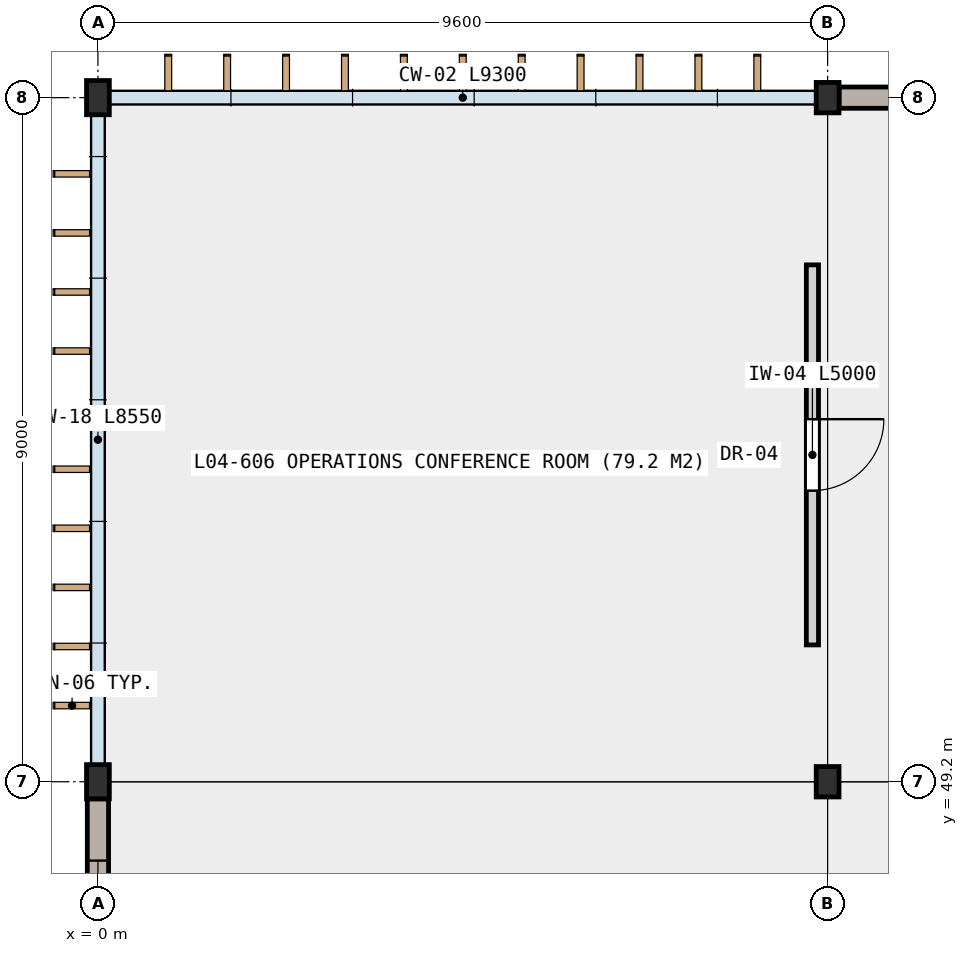
"""IFC4 building model, lengths in metres.
Left out: names, types, materials, properties, quantities, classifications, styles, units other than length and angle.
Written with IfcOpenShell. Run it as: python <this file> out.ifc"""

import sys

from ifc_helpers import new_model, si_unit, direction, frame, frame_2d, origin, origin_2d, place, context, subcontext, project, spatial, rectangle, i_section, extrude, element, fill, save


model = new_model("IFC4")
c1 = context("Model", 3, precision=1e-05, world=origin(), true_north=direction((0.0, 1.0)))
c2 = subcontext(c1, "Body", "Model", "MODEL_VIEW")
j1 = project(units=[si_unit("LENGTHUNIT", "METRE"), si_unit("PLANEANGLEUNIT", "RADIAN")], contexts=[c1])
p1 = place(None, origin())
s1 = spatial("IfcSite", under=j1, at=p1, CompositionType="ELEMENT")
p2 = place(p1, origin())
s2 = spatial("IfcBuilding", under=s1, at=p2, CompositionType="ELEMENT")
p3 = place(p2, frame((0.0, 0.0, 18.6)))
s3 = spatial("IfcBuildingStorey", under=s2, at=p3, CompositionType="ELEMENT", Elevation=18.6)
for number, where, z_axis, x_axis in (
    (1, (0.0, 49.2, 0.0), (0.0, 0.0, 1.0), (1.0, 0.0, 0.0)),
    (2, (0.0, 58.2, 0.0), (0.0, 0.0, 1.0), (1.0, 0.0, 0.0)),
):
    element("IfcColumn", number, at=place(p3, frame(where, z_axis=z_axis, x_axis=x_axis)), inside=s3, PredefinedType="COLUMN", context=c2, shape_type="SweptSolid", body=[
        extrude(i_section(OverallWidth=0.3, OverallDepth=0.45, WebThickness=0.014, FlangeThickness=0.026, FilletRadius=0.027, at=origin_2d()), origin(), (0.0, 0.0, 1.0), 4.2),
    ])
for number, where, z_axis, x_axis in (
    (3, (9.6, 49.2, 0.0), (0.0, 0.0, 1.0), (1.0, 0.0, 0.0)),
    (4, (9.6, 58.2, 0.0), (0.0, 0.0, 1.0), (1.0, 0.0, 0.0)),
):
    element("IfcColumn", number, at=place(p3, frame(where, z_axis=z_axis, x_axis=x_axis)), inside=s3, PredefinedType="COLUMN", context=c2, shape_type="SweptSolid", body=[
        extrude(i_section(OverallWidth=0.3, OverallDepth=0.4, WebThickness=0.013, FlangeThickness=0.024, FilletRadius=0.027, at=origin_2d()), origin(), (0.0, 0.0, 1.0), 4.2),
    ])
p4 = place(p3, frame((0.0, 40.425, 0.0), z_axis=(0.0, 0.0, 1.0), x_axis=(0.0, 1.0, 0.0)))
e5 = element("IfcWall", 5, at=p4, inside=s3, PredefinedType="SOLIDWALL", context=c2, shape_type="SweptSolid", body=[
    extrude(rectangle(XDim=8.55, YDim=0.28, at=frame_2d((4.275, 0.0))), origin(), (0.0, 0.0, 1.0), 3.53),
])
p5 = place(p4, frame((0.887, 0.0, 0.85)))
e6 = element("IfcOpeningElement", 6, at=p5, cuts=e5, PredefinedType="OPENING", context=c2, shape_type="SweptSolid", body=[
    extrude(rectangle(XDim=2.5, YDim=2.15, at=frame_2d((1.25, 1.075))), frame((0.0, 0.15, 0.0), z_axis=(0.0, -1.0, 0.0), x_axis=(1.0, 0.0, 0.0)), (0.0, 0.0, 1.0), 0.3),
])
p6 = place(p4, frame((5.087, 0.0, 0.85)))
e7 = element("IfcOpeningElement", 7, at=p6, cuts=e5, PredefinedType="OPENING", context=c2, shape_type="SweptSolid", body=[
    extrude(rectangle(XDim=2.65, YDim=1.5, at=frame_2d((1.325, 0.75))), frame((0.0, 0.15, 0.0), z_axis=(0.0, -1.0, 0.0), x_axis=(1.0, 0.0, 0.0)), (0.0, 0.0, 1.0), 0.3),
])
p7 = place(p3, frame((9.75, 58.2, 0.0), z_axis=(0.0, 0.0, 1.0), x_axis=(1.0, 0.0, 0.0)))
e8 = element("IfcWall", 8, at=p7, inside=s3, PredefinedType="SOLIDWALL", context=c2, shape_type="SweptSolid", body=[
    extrude(rectangle(XDim=9.2, YDim=0.28, at=frame_2d((4.6, 0.0))), origin(), (0.0, 0.0, 1.0), 3.96),
])
p8 = place(p7, frame((0.975, 0.0, 0.85)))
e9 = element("IfcOpeningElement", 9, at=p8, cuts=e8, PredefinedType="OPENING", context=c2, shape_type="SweptSolid", body=[
    extrude(rectangle(XDim=2.65, YDim=1.85, at=frame_2d((1.325, 0.925))), frame((0.0, 0.15, 0.0), z_axis=(0.0, -1.0, 0.0), x_axis=(1.0, 0.0, 0.0)), (0.0, 0.0, 1.0), 0.3),
])
p9 = place(p7, frame((5.575, 0.0, 0.85)))
e10 = element("IfcOpeningElement", 10, at=p9, cuts=e8, PredefinedType="OPENING", context=c2, shape_type="SweptSolid", body=[
    extrude(rectangle(XDim=2.65, YDim=2.15, at=frame_2d((1.325, 1.075))), frame((0.0, 0.15, 0.0), z_axis=(0.0, -1.0, 0.0), x_axis=(1.0, 0.0, 0.0)), (0.0, 0.0, 1.0), 0.3),
])
p10 = place(p3, frame((9.4, 56.0, 0.0), z_axis=(0.0, 0.0, 1.0), x_axis=(0.0, -1.0, 0.0)))
e11 = element("IfcWall", 11, at=p10, inside=s3, PredefinedType="PARTITIONING", context=c2, shape_type="SweptSolid", body=[
    extrude(rectangle(XDim=5.0, YDim=0.16, at=frame_2d((2.5, 0.0))), origin(), (0.0, 0.0, 1.0), 3.57),
])
p11 = place(p10, frame((2.03, 0.0, 0.0)))
e12 = element("IfcOpeningElement", 12, at=p11, cuts=e11, PredefinedType="OPENING", context=c2, shape_type="SweptSolid", body=[
    extrude(rectangle(XDim=0.94, YDim=2.12, at=frame_2d((0.47, 1.06))), frame((0.0, 0.09, 0.0), z_axis=(0.0, -1.0, 0.0), x_axis=(1.0, 0.0, 0.0)), (0.0, 0.0, 1.0), 0.18),
])
p12 = place(p6, origin())
e13 = element("IfcWindow", 13, at=p12, inside=s3, PartitioningType="SINGLE_PANEL", PredefinedType="WINDOW", context=c2, shape_type="SweptSolid", body=[
    extrude(rectangle(XDim=2.65, YDim=1.5, at=frame_2d((1.325, 0.75))), frame((0.0, 0.03, 0.0), z_axis=(0.0, -1.0, 0.0), x_axis=(1.0, 0.0, 0.0)), (0.0, 0.0, 1.0), 0.06),
])
fill(e7, e13)
p13 = place(p11, origin())
e14 = element("IfcDoor", 14, at=p13, inside=s3, OperationType="SINGLE_SWING_LEFT", PredefinedType="DOOR", context=c2, shape_type="SweptSolid", body=[
    extrude(rectangle(XDim=0.94, YDim=2.12, at=frame_2d((0.47, 1.06))), frame((0.0, 0.025, 0.0), z_axis=(0.0, -1.0, 0.0), x_axis=(1.0, 0.0, 0.0)), (0.0, 0.0, 1.0), 0.05),
])
fill(e12, e14)
save(model, sys.argv[1])
